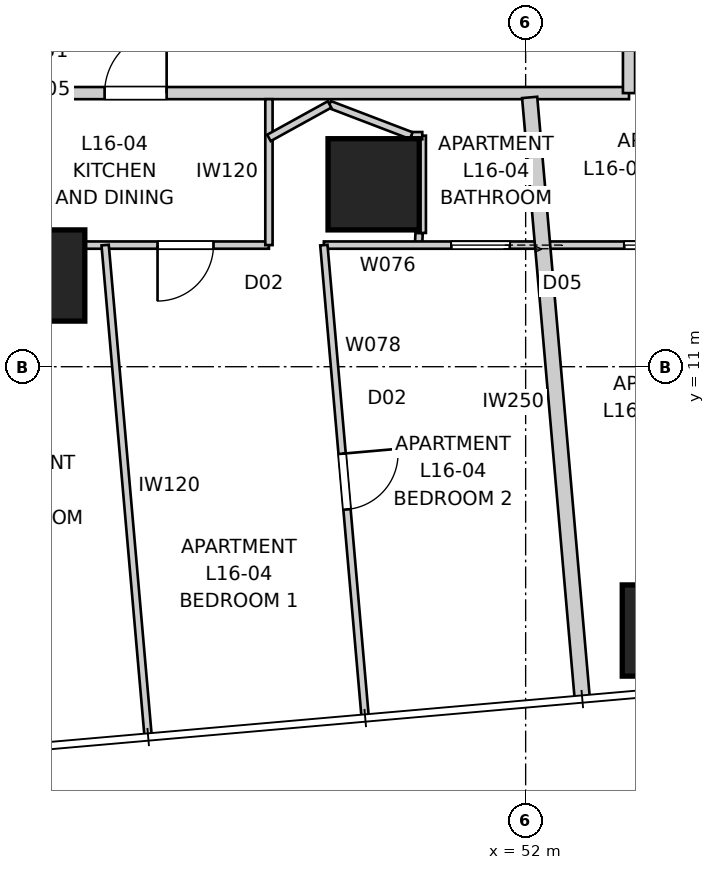
"""IFC4 building model, lengths in metres.
Left out: names, types, materials, properties, quantities, classifications, styles, units other than length and angle.
Written with IfcOpenShell. Run it as: python <this file> out.ifc"""

import sys

from ifc_helpers import new_model, si_unit, direction, frame, frame_2d, origin, origin_2d, place, context, subcontext, project, spatial, rectangle, extrude, element, fill, save


model = new_model("IFC4")
c1 = context("Model", 3, precision=1e-05, world=origin(), true_north=direction((0.0, 1.0)))
c2 = subcontext(c1, "Body", "Model", "MODEL_VIEW")
j1 = project(units=[si_unit("LENGTHUNIT", "METRE"), si_unit("PLANEANGLEUNIT", "RADIAN")], contexts=[c1])
p1 = place(None, origin())
s1 = spatial("IfcSite", under=j1, at=p1, CompositionType="ELEMENT")
p2 = place(p1, origin())
s2 = spatial("IfcBuilding", under=s1, at=p2, CompositionType="ELEMENT")
p3 = place(p2, frame((0.0, 0.0, 60.8)))
s3 = spatial("IfcBuildingStorey", under=s2, at=p3, CompositionType="ELEMENT", Elevation=60.8)
for number, where, z_axis, x_axis in (
    (1, (54.339, 6.661, 0.0), (0.0, 0.0, 1.0), (1.0, 0.0, 0.0)),
    (2, (44.0, 12.5, 0.0), (0.0, 0.0, 1.0), (1.0, 0.0, 0.0)),
    (3, (49.5, 14.0, 0.0), (0.0, 0.0, 1.0), (1.0, 0.0, 0.0)),
):
    element("IfcColumn", number, at=place(p3, frame(where, z_axis=z_axis, x_axis=x_axis)), inside=s3, PredefinedType="COLUMN", context=c2, shape_type="SweptSolid", body=[
        extrude(rectangle(XDim=1.5, YDim=1.5, at=origin_2d()), origin(), (0.0, 0.0, 1.0), 3.4),
    ])
p4 = place(p3, frame((26.3, 15.5, 0.0), z_axis=(0.0, 0.0, 1.0), x_axis=(1.0, 0.0, 0.0)))
e4 = element("IfcWall", 4, at=p4, inside=s3, PredefinedType="PARTITIONING", context=c2, shape_type="SweptSolid", body=[
    extrude(rectangle(XDim=27.4, YDim=0.2, at=frame_2d((13.7, 0.0))), origin(), (0.0, 0.0, 1.0), 3.25),
])
p5 = place(p4, frame((18.776, 0.0, 0.0)))
e5 = element("IfcOpeningElement", 5, at=p5, cuts=e4, PredefinedType="OPENING", context=c2, shape_type="SweptSolid", body=[
    extrude(rectangle(XDim=1.02, YDim=2.34, at=frame_2d((0.51, 1.17))), frame((0.0, 0.11, 0.0), z_axis=(0.0, -1.0, 0.0), x_axis=(1.0, 0.0, 0.0)), (0.0, 0.0, 1.0), 0.22),
])
p6 = place(p4, frame((5.793, 0.0, 0.0)))
e6 = element("IfcOpeningElement", 6, at=p6, cuts=e4, PredefinedType="OPENING", context=c2, shape_type="SweptSolid", body=[
    extrude(rectangle(XDim=1.02, YDim=2.34, at=frame_2d((0.51, 1.17))), frame((0.0, 0.11, 0.0), z_axis=(0.0, -1.0, 0.0), x_axis=(1.0, 0.0, 0.0)), (0.0, 0.0, 1.0), 0.22),
])
p7 = place(p3, frame((53.7, 15.5, 0.0), z_axis=(0.0, 0.0, 1.0), x_axis=(0.0, 1.0, 0.0)))
e7 = element("IfcWall", 7, at=p7, inside=s3, PredefinedType="PARTITIONING", context=c2, shape_type="SweptSolid", body=[
    extrude(rectangle(XDim=29.0, YDim=0.2, at=frame_2d((14.5, 0.0))), origin(), (0.0, 0.0, 1.0), 3.25),
])
p8 = place(p7, frame((12.997, 0.0, 0.0)))
e8 = element("IfcOpeningElement", 8, at=p8, cuts=e7, PredefinedType="OPENING", context=c2, shape_type="SweptSolid", body=[
    extrude(rectangle(XDim=1.02, YDim=2.34, at=frame_2d((0.51, 1.17))), frame((0.0, 0.11, 0.0), z_axis=(0.0, -1.0, 0.0), x_axis=(1.0, 0.0, 0.0)), (0.0, 0.0, 1.0), 0.22),
])
p9 = place(p7, frame((19.891, 0.0, 0.0)))
e9 = element("IfcOpeningElement", 9, at=p9, cuts=e7, PredefinedType="OPENING", context=c2, shape_type="SweptSolid", body=[
    extrude(rectangle(XDim=1.02, YDim=2.34, at=frame_2d((0.51, 1.17))), frame((0.0, 0.11, 0.0), z_axis=(0.0, -1.0, 0.0), x_axis=(1.0, 0.0, 0.0)), (0.0, 0.0, 1.0), 0.22),
])
p10 = place(p7, frame((2.425, 0.0, 0.0)))
e10 = element("IfcOpeningElement", 10, at=p10, cuts=e7, PredefinedType="OPENING", context=c2, shape_type="SweptSolid", body=[
    extrude(rectangle(XDim=1.02, YDim=2.1, at=frame_2d((0.51, 1.05))), frame((0.0, 0.11, 0.0), z_axis=(0.0, -1.0, 0.0), x_axis=(1.0, 0.0, 0.0)), (0.0, 0.0, 1.0), 0.22),
])
p11 = place(p7, frame((27.055, 0.0, 0.0)))
e11 = element("IfcOpeningElement", 11, at=p11, cuts=e7, PredefinedType="OPENING", context=c2, shape_type="SweptSolid", body=[
    extrude(rectangle(XDim=1.02, YDim=2.34, at=frame_2d((0.51, 1.17))), frame((0.0, 0.11, 0.0), z_axis=(0.0, -1.0, 0.0), x_axis=(1.0, 0.0, 0.0)), (0.0, 0.0, 1.0), 0.22),
])
p12 = place(p3, frame((52.932, 5.534, 0.0), z_axis=(0.0, 0.0, 1.0), x_axis=(-0.087157803114, 0.996194517831, 0.0)))
e12 = element("IfcWall", 12, at=p12, inside=s3, PredefinedType="PARTITIONING", context=c2, shape_type="SweptSolid", body=[
    extrude(rectangle(XDim=9.933, YDim=0.25, at=frame_2d((4.966, 0.0))), origin(), (0.0, 0.0, 1.0), 3.25),
])
p13 = place(p3, frame((47.778, 13.0, 0.0), z_axis=(0.0, 0.0, 1.0), x_axis=(-1.0, 0.0, 0.0)))
e13 = element("IfcWall", 13, at=p13, inside=s3, PredefinedType="PARTITIONING", context=c2, shape_type="SweptSolid", body=[
    extrude(rectangle(XDim=17.082, YDim=0.12, at=frame_2d((8.541, 0.0))), origin(), (0.0, 0.0, 1.0), 2.55),
])
p14 = place(p13, frame((0.912, 0.0, 0.0)))
e14 = element("IfcOpeningElement", 14, at=p14, cuts=e13, PredefinedType="OPENING", context=c2, shape_type="SweptSolid", body=[
    extrude(rectangle(XDim=0.92, YDim=2.34, at=frame_2d((0.46, 1.17))), frame((0.0, 0.07, 0.0), z_axis=(0.0, -1.0, 0.0), x_axis=(1.0, 0.0, 0.0)), (0.0, 0.0, 1.0), 0.14),
])
p15 = place(p13, frame((14.798, 0.0, 0.0)))
e15 = element("IfcOpeningElement", 15, at=p15, cuts=e13, PredefinedType="OPENING", context=c2, shape_type="SweptSolid", body=[
    extrude(rectangle(XDim=0.92, YDim=2.34, at=frame_2d((0.46, 1.17))), frame((0.0, 0.07, 0.0), z_axis=(0.0, -1.0, 0.0), x_axis=(1.0, 0.0, 0.0)), (0.0, 0.0, 1.0), 0.14),
])
p16 = place(p13, frame((4.858, 0.0, 0.0)))
e16 = element("IfcOpeningElement", 16, at=p16, cuts=e13, PredefinedType="OPENING", context=c2, shape_type="SweptSolid", body=[
    extrude(rectangle(XDim=0.96, YDim=2.1, at=frame_2d((0.48, 1.05))), frame((0.0, 0.07, 0.0), z_axis=(0.0, -1.0, 0.0), x_axis=(1.0, 0.0, 0.0)), (0.0, 0.0, 1.0), 0.14),
])
p17 = place(p13, frame((7.635, 0.0, 0.0)))
e17 = element("IfcOpeningElement", 17, at=p17, cuts=e13, PredefinedType="OPENING", context=c2, shape_type="SweptSolid", body=[
    extrude(rectangle(XDim=0.96, YDim=2.1, at=frame_2d((0.48, 1.05))), frame((0.0, 0.07, 0.0), z_axis=(0.0, -1.0, 0.0), x_axis=(1.0, 0.0, 0.0)), (0.0, 0.0, 1.0), 0.14),
])
p18 = place(p3, frame((47.778, 15.4, 0.0), z_axis=(0.0, 0.0, 1.0), x_axis=(0.0, -1.0, 0.0)))
e18 = element("IfcWall", 18, at=p18, inside=s3, PredefinedType="PARTITIONING", context=c2, shape_type="SweptSolid", body=[
    extrude(rectangle(XDim=2.4, YDim=0.12, at=frame_2d((1.2, 0.0))), origin(), (0.0, 0.0, 1.0), 3.25),
])
p19 = place(p3, frame((50.239, 13.0, 0.0), z_axis=(0.0, 0.0, 1.0), x_axis=(0.045131013234, 0.99898107672, 0.0)))
e19 = element("IfcWall", 19, at=p19, inside=s3, PredefinedType="PARTITIONING", context=c2, shape_type="SweptSolid", body=[
    extrude(rectangle(XDim=0.2, YDim=0.12, at=frame_2d((0.1, 0.0))), origin(), (0.0, 0.0, 1.0), 3.25),
])
p20 = place(p3, frame((50.3, 13.2, 0.0), z_axis=(0.0, 0.0, 1.0), x_axis=(0.0, 1.0, 0.0)))
e20 = element("IfcWall", 20, at=p20, inside=s3, PredefinedType="PARTITIONING", context=c2, shape_type="SweptSolid", body=[
    extrude(rectangle(XDim=1.6, YDim=0.12, at=frame_2d((0.8, 0.0))), origin(), (0.0, 0.0, 1.0), 3.25),
])
p21 = place(p3, frame((50.119, 14.8, 0.0), z_axis=(0.0, 0.0, 1.0), x_axis=(-0.934135067997, 0.356919703488, 0.0)))
e21 = element("IfcWall", 21, at=p21, inside=s3, PredefinedType="PARTITIONING", context=c2, shape_type="SweptSolid", body=[
    extrude(rectangle(XDim=1.438, YDim=0.12, at=frame_2d((0.719, 0.0))), origin(), (0.0, 0.0, 1.0), 3.25),
])
p22 = place(p3, frame((48.775, 15.313, 0.0), z_axis=(0.0, 0.0, 1.0), x_axis=(-0.875508887439, -0.483202015741, 0.0)))
e22 = element("IfcWall", 22, at=p22, inside=s3, PredefinedType="PARTITIONING", context=c2, shape_type="SweptSolid", body=[
    extrude(rectangle(XDim=1.139, YDim=0.12, at=frame_2d((0.569, 0.0))), origin(), (0.0, 0.0, 1.0), 3.25),
])
p23 = place(p3, frame((56.2, 13.0, 0.0), z_axis=(0.0, 0.0, 1.0), x_axis=(-1.0, 0.0, 0.0)))
e23 = element("IfcWall", 23, at=p23, inside=s3, PredefinedType="PARTITIONING", context=c2, shape_type="SweptSolid", body=[
    extrude(rectangle(XDim=7.519, YDim=0.12, at=frame_2d((3.759, 0.0))), origin(), (0.0, 0.0, 1.0), 3.25),
])
p24 = place(p23, frame((1.618, 0.0, 0.0)))
e24 = element("IfcOpeningElement", 24, at=p24, cuts=e23, PredefinedType="OPENING", context=c2, shape_type="SweptSolid", body=[
    extrude(rectangle(XDim=0.96, YDim=2.1, at=frame_2d((0.48, 1.05))), frame((0.0, 0.07, 0.0), z_axis=(0.0, -1.0, 0.0), x_axis=(1.0, 0.0, 0.0)), (0.0, 0.0, 1.0), 0.14),
])
p25 = place(p23, frame((4.461, 0.0, 0.0)))
e25 = element("IfcOpeningElement", 25, at=p25, cuts=e23, PredefinedType="OPENING", context=c2, shape_type="SweptSolid", body=[
    extrude(rectangle(XDim=0.96, YDim=2.1, at=frame_2d((0.48, 1.05))), frame((0.0, 0.07, 0.0), z_axis=(0.0, -1.0, 0.0), x_axis=(1.0, 0.0, 0.0)), (0.0, 0.0, 1.0), 0.14),
])
p26 = place(p3, frame((45.084, 13.0, 0.0), z_axis=(0.0, 0.0, 1.0), x_axis=(0.087184938313, -0.99619214338, 0.0)))
e26 = element("IfcWall", 26, at=p26, inside=s3, PredefinedType="PARTITIONING", context=c2, shape_type="SweptSolid", body=[
    extrude(rectangle(XDim=8.082, YDim=0.12, at=frame_2d((4.041, 0.0))), origin(), (0.0, 0.0, 1.0), 3.25),
])
p27 = place(p3, frame((48.681, 13.0, 0.0), z_axis=(0.0, 0.0, 1.0), x_axis=(0.0871517452, -0.996195047824, 0.0)))
e27 = element("IfcWall", 27, at=p27, inside=s3, PredefinedType="PARTITIONING", context=c2, shape_type="SweptSolid", body=[
    extrude(rectangle(XDim=7.768, YDim=0.12, at=frame_2d((3.884, 0.0))), origin(), (0.0, 0.0, 1.0), 3.25),
])
p28 = place(p27, frame((3.444, 0.0, 0.0)))
e28 = element("IfcOpeningElement", 28, at=p28, cuts=e27, PredefinedType="OPENING", context=c2, shape_type="SweptSolid", body=[
    extrude(rectangle(XDim=0.92, YDim=2.34, at=frame_2d((0.46, 1.17))), frame((0.0, 0.07, 0.0), z_axis=(0.0, -1.0, 0.0), x_axis=(1.0, 0.0, 0.0)), (0.0, 0.0, 1.0), 0.14),
])
p29 = place(p3, frame((50.3, 14.8, 0.0), z_axis=(0.0, 0.0, 1.0), x_axis=(-1.0, 0.0, 0.0)))
e29 = element("IfcWall", 29, at=p29, inside=s3, PredefinedType="PARTITIONING", context=c2, shape_type="SweptSolid", body=[
    extrude(rectangle(XDim=0.181, YDim=0.12, at=frame_2d((0.09, 0.0))), origin(), (0.0, 0.0, 1.0), 3.25),
])
p30 = place(p5, origin())
e30 = element("IfcDoor", 30, at=p30, inside=s3, OperationType="SINGLE_SWING_RIGHT", PredefinedType="DOOR", context=c2, shape_type="SweptSolid", body=[
    extrude(rectangle(XDim=1.02, YDim=2.34, at=frame_2d((0.51, 1.17))), frame((0.0, 0.025, 0.0), z_axis=(0.0, -1.0, 0.0), x_axis=(1.0, 0.0, 0.0)), (0.0, 0.0, 1.0), 0.05),
])
fill(e5, e30)
p31 = place(p14, origin())
e31 = element("IfcDoor", 31, at=p31, inside=s3, OperationType="SINGLE_SWING_RIGHT", PredefinedType="DOOR", context=c2, shape_type="SweptSolid", body=[
    extrude(rectangle(XDim=0.92, YDim=2.34, at=frame_2d((0.46, 1.17))), frame((0.0, 0.025, 0.0), z_axis=(0.0, -1.0, 0.0), x_axis=(1.0, 0.0, 0.0)), (0.0, 0.0, 1.0), 0.05),
])
fill(e14, e31)
p32 = place(p24, origin())
e32 = element("IfcDoor", 32, at=p32, inside=s3, OperationType="SLIDING_TO_LEFT", PredefinedType="DOOR", context=c2, shape_type="SweptSolid", body=[
    extrude(rectangle(XDim=0.96, YDim=2.1, at=frame_2d((0.48, 1.05))), frame((0.0, 0.025, 0.0), z_axis=(0.0, -1.0, 0.0), x_axis=(1.0, 0.0, 0.0)), (0.0, 0.0, 1.0), 0.05),
])
fill(e24, e32)
p33 = place(p28, origin())
e33 = element("IfcDoor", 33, at=p33, inside=s3, OperationType="SINGLE_SWING_LEFT", PredefinedType="DOOR", context=c2, shape_type="SweptSolid", body=[
    extrude(rectangle(XDim=0.92, YDim=2.34, at=frame_2d((0.46, 1.17))), frame((0.0, 0.025, 0.0), z_axis=(0.0, -1.0, 0.0), x_axis=(1.0, 0.0, 0.0)), (0.0, 0.0, 1.0), 0.05),
])
fill(e28, e33)
p34 = place(p25, origin())
e34 = element("IfcDoor", 34, at=p34, inside=s3, OperationType="SLIDING_TO_LEFT", PredefinedType="DOOR", context=c2, shape_type="SweptSolid", body=[
    extrude(rectangle(XDim=0.96, YDim=2.1, at=frame_2d((0.48, 1.05))), frame((0.0, 0.025, 0.0), z_axis=(0.0, -1.0, 0.0), x_axis=(1.0, 0.0, 0.0)), (0.0, 0.0, 1.0), 0.05),
])
fill(e25, e34)
save(model, sys.argv[1])
